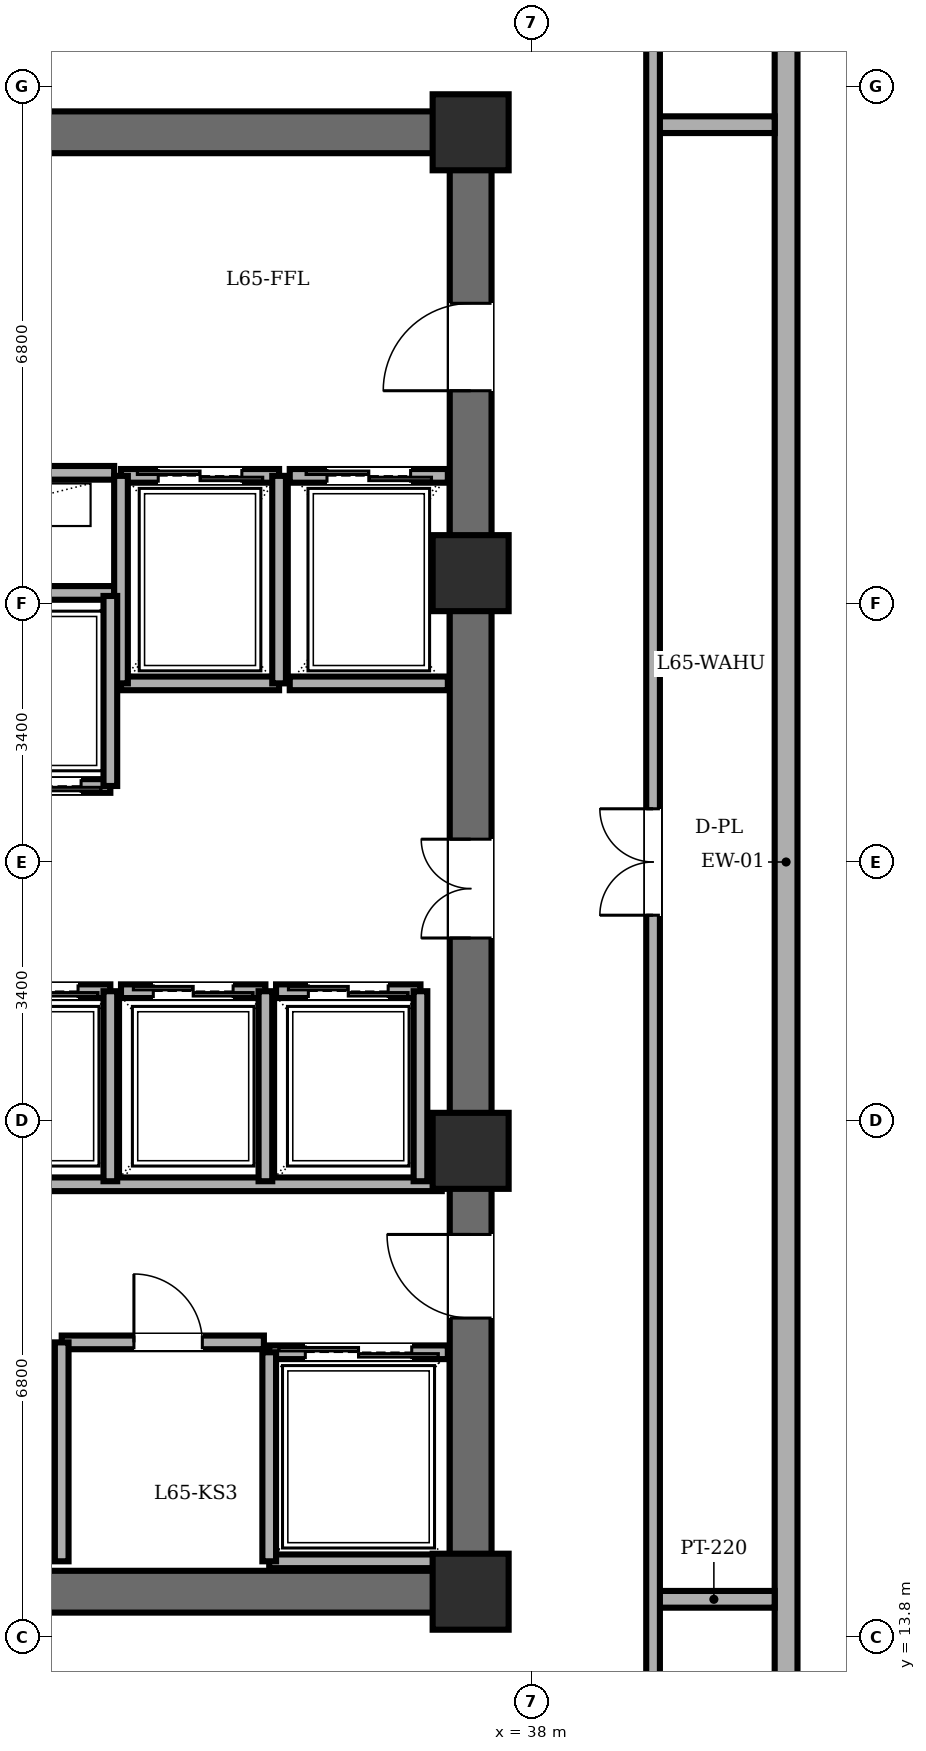
"""IFC4 building model, lengths in metres.
Left out: names, types, materials, properties, quantities, classifications, styles, units other than length and angle.
Written with IfcOpenShell. Run it as: python <this file> out.ifc"""

import sys

from ifc_helpers import new_model, si_unit, direction, frame, frame_2d, origin, origin_2d, place, context, subcontext, project, spatial, rectangle, extrude, element, fill, save


model = new_model("IFC4")
c1 = context("Model", 3, precision=1e-05, world=origin(), true_north=direction((0.0, 1.0)))
c2 = subcontext(c1, "Body", "Model", "MODEL_VIEW")
j1 = project(units=[si_unit("LENGTHUNIT", "METRE"), si_unit("PLANEANGLEUNIT", "RADIAN")], contexts=[c1])
p1 = place(None, origin())
s1 = spatial("IfcSite", under=j1, at=p1, CompositionType="ELEMENT")
p2 = place(p1, origin())
s2 = spatial("IfcBuilding", under=s1, at=p2, CompositionType="ELEMENT")
p3 = place(p2, frame((0.0, 0.0, 248.1)))
s3 = spatial("IfcBuildingStorey", under=s2, at=p3, CompositionType="ELEMENT", Elevation=248.1)
for number, where, z_axis, x_axis in (
    (1, (37.2, 14.4, 0.0), (0.0, 0.0, 1.0), (1.0, 0.0, 0.0)),
    (2, (37.2, 20.2, 0.0), (0.0, 0.0, 1.0), (1.0, 0.0, 0.0)),
    (3, (37.2, 27.8, 0.0), (0.0, 0.0, 1.0), (1.0, 0.0, 0.0)),
    (4, (37.2, 33.6, 0.0), (0.0, 0.0, 1.0), (1.0, 0.0, 0.0)),
):
    element("IfcColumn", number, at=place(p3, frame(where, z_axis=z_axis, x_axis=x_axis)), inside=s3, PredefinedType="COLUMN", context=c2, shape_type="SweptSolid", body=[
        extrude(rectangle(XDim=1.0, YDim=1.0, at=origin_2d()), origin(), (0.0, 0.0, 1.0), 5.6),
    ])
p4 = place(p3, frame((41.35, 7.8, 0.0), z_axis=(0.0, 0.0, 1.0), x_axis=(0.0, 1.0, 0.0)))
e5 = element("IfcWall", 5, at=p4, inside=s3, PredefinedType="SOLIDWALL", context=c2, shape_type="SweptSolid", body=[
    extrude(rectangle(XDim=32.4, YDim=0.3, at=frame_2d((16.2, 0.0))), origin(), (0.0, 0.0, 1.0), 5.36),
])
for number, where, z_axis, x_axis in (
    (6, (21.6, 33.6, 0.0), (0.0, 0.0, 1.0), (1.0, 0.0, 0.0)),
    (7, (37.2, 14.4, 0.0), (0.0, 0.0, 1.0), (-1.0, 0.0, 0.0)),
):
    element("IfcWall", number, at=place(p3, frame(where, z_axis=z_axis, x_axis=x_axis)), inside=s3, PredefinedType="SHEAR", context=c2, shape_type="SweptSolid", body=[
        extrude(rectangle(XDim=15.6, YDim=0.55, at=frame_2d((7.8, 0.0))), origin(), (0.0, 0.0, 1.0), 5.36),
    ])
p5 = place(p3, frame((37.2, 14.4, 0.0), z_axis=(0.0, 0.0, 1.0), x_axis=(0.0, 1.0, 0.0)))
e8 = element("IfcWall", 8, at=p5, inside=s3, PredefinedType="SHEAR", context=c2, shape_type="SweptSolid", body=[
    extrude(rectangle(XDim=19.2, YDim=0.55, at=frame_2d((9.6, 0.0))), origin(), (0.0, 0.0, 1.0), 5.36),
])
p6 = place(p5, frame((15.8, 0.0, 0.0)))
e9 = element("IfcOpeningElement", 9, at=p6, cuts=e8, PredefinedType="OPENING", context=c2, shape_type="SweptSolid", body=[
    extrude(rectangle(XDim=1.15, YDim=2.15, at=frame_2d((0.575, 1.075))), frame((0.0, 0.285, 0.0), z_axis=(0.0, -1.0, 0.0), x_axis=(1.0, 0.0, 0.0)), (0.0, 0.0, 1.0), 0.57),
])
p7 = place(p5, frame((3.6, 0.0, 0.0)))
e10 = element("IfcOpeningElement", 10, at=p7, cuts=e8, PredefinedType="OPENING", context=c2, shape_type="SweptSolid", body=[
    extrude(rectangle(XDim=1.1, YDim=2.15, at=frame_2d((0.55, 1.075))), frame((0.0, 0.285, 0.0), z_axis=(0.0, -1.0, 0.0), x_axis=(1.0, 0.0, 0.0)), (0.0, 0.0, 1.0), 0.57),
])
p8 = place(p5, frame((8.6, 0.0, 0.0)))
e11 = element("IfcOpeningElement", 11, at=p8, cuts=e8, PredefinedType="OPENING", context=c2, shape_type="SweptSolid", body=[
    extrude(rectangle(XDim=1.3, YDim=2.2, at=frame_2d((0.65, 1.1))), frame((0.0, 0.285, 0.0), z_axis=(0.0, -1.0, 0.0), x_axis=(1.0, 0.0, 0.0)), (0.0, 0.0, 1.0), 0.57),
])
p9 = place(p3, frame((30.27, 29.12, 0.0), z_axis=(0.0, 0.0, 1.0), x_axis=(1.0, 0.0, 0.0)))
e12 = element("IfcWall", 12, at=p9, inside=s3, PredefinedType="PARTITIONING", context=c2, shape_type="SweptSolid", body=[
    extrude(rectangle(XDim=2.24, YDim=0.18, at=frame_2d((1.12, 0.0))), origin(), (0.0, 0.0, 1.0), 5.36),
])
p10 = place(p3, frame((21.95, 27.54, 0.0), z_axis=(0.0, 0.0, 1.0), x_axis=(1.0, 0.0, 0.0)))
e13 = element("IfcWall", 13, at=p10, inside=s3, PredefinedType="PARTITIONING", context=c2, shape_type="SweptSolid", body=[
    extrude(rectangle(XDim=10.56, YDim=0.18, at=frame_2d((5.28, 0.0))), origin(), (0.0, 0.0, 1.0), 5.36),
])
p11 = place(p3, frame((21.95, 19.76, 0.0), z_axis=(0.0, 0.0, 1.0), x_axis=(1.0, 0.0, 0.0)))
e14 = element("IfcWall", 14, at=p11, inside=s3, PredefinedType="PARTITIONING", context=c2, shape_type="SweptSolid", body=[
    extrude(rectangle(XDim=14.87, YDim=0.18, at=frame_2d((7.435, 0.0))), origin(), (0.0, 0.0, 1.0), 5.36),
])
p12 = place(p3, frame((31.82, 17.68, 0.0), z_axis=(0.0, 0.0, 1.0), x_axis=(1.0, 0.0, 0.0)))
e15 = element("IfcWall", 15, at=p12, inside=s3, PredefinedType="PARTITIONING", context=c2, shape_type="SweptSolid", body=[
    extrude(rectangle(XDim=2.66, YDim=0.18, at=frame_2d((1.33, 0.0))), origin(), (0.0, 0.0, 1.0), 5.36),
])
p13 = place(p12, frame((0.95, 0.0, 0.0)))
e16 = element("IfcOpeningElement", 16, at=p13, cuts=e15, PredefinedType="OPENING", context=c2, shape_type="SweptSolid", body=[
    extrude(rectangle(XDim=0.9, YDim=2.05, at=frame_2d((0.45, 1.025))), frame((0.0, 0.1, 0.0), z_axis=(0.0, -1.0, 0.0), x_axis=(1.0, 0.0, 0.0)), (0.0, 0.0, 1.0), 0.2),
])
p14 = place(p3, frame((31.82, 14.8, 0.0), z_axis=(0.0, 0.0, 1.0), x_axis=(0.0, 1.0, 0.0)))
e17 = element("IfcWall", 17, at=p14, inside=s3, PredefinedType="PARTITIONING", context=c2, shape_type="SweptSolid", body=[
    extrude(rectangle(XDim=2.88, YDim=0.18, at=frame_2d((1.44, 0.0))), origin(), (0.0, 0.0, 1.0), 5.36),
])
p15 = place(p3, frame((32.6, 29.08, 0.0), z_axis=(0.0, 0.0, 1.0), x_axis=(1.0, 0.0, 0.0)))
e18 = element("IfcWall", 18, at=p15, inside=s3, PredefinedType="PARTITIONING", context=c2, shape_type="SweptSolid", body=[
    extrude(rectangle(XDim=2.08, YDim=0.18, at=frame_2d((1.04, 0.0))), origin(), (0.0, 0.0, 1.0), 5.36),
])
p16 = place(p15, frame((0.49, 0.0, 0.0)))
e19 = element("IfcOpeningElement", 19, at=p16, cuts=e18, PredefinedType="OPENING", context=c2, shape_type="SweptSolid", body=[
    extrude(rectangle(XDim=1.1, YDim=2.2, at=frame_2d((0.55, 1.1))), frame((0.0, 0.1, 0.0), z_axis=(0.0, -1.0, 0.0), x_axis=(1.0, 0.0, 0.0)), (0.0, 0.0, 1.0), 0.2),
])
p17 = place(p3, frame((34.68, 26.35, 0.0), z_axis=(0.0, 0.0, 1.0), x_axis=(-1.0, 0.0, 0.0)))
e20 = element("IfcWall", 20, at=p17, inside=s3, PredefinedType="PARTITIONING", context=c2, shape_type="SweptSolid", body=[
    extrude(rectangle(XDim=2.08, YDim=0.18, at=frame_2d((1.04, 0.0))), origin(), (0.0, 0.0, 1.0), 5.36),
])
for number, where, z_axis, x_axis in (
    (21, (34.68, 26.35, 0.0), (0.0, 0.0, 1.0), (0.0, 1.0, 0.0)),
    (22, (32.6, 29.08, 0.0), (0.0, 0.0, 1.0), (0.0, -1.0, 0.0)),
):
    element("IfcWall", number, at=place(p3, frame(where, z_axis=z_axis, x_axis=x_axis)), inside=s3, PredefinedType="PARTITIONING", context=c2, shape_type="SweptSolid", body=[
        extrude(rectangle(XDim=2.73, YDim=0.18, at=frame_2d((1.365, 0.0))), origin(), (0.0, 0.0, 1.0), 5.36),
    ])
p18 = place(p3, frame((34.82, 29.08, 0.0), z_axis=(0.0, 0.0, 1.0), x_axis=(1.0, 0.0, 0.0)))
e23 = element("IfcWall", 23, at=p18, inside=s3, PredefinedType="PARTITIONING", context=c2, shape_type="SweptSolid", body=[
    extrude(rectangle(XDim=2.08, YDim=0.18, at=frame_2d((1.04, 0.0))), origin(), (0.0, 0.0, 1.0), 5.36),
])
p19 = place(p18, frame((0.49, 0.0, 0.0)))
e24 = element("IfcOpeningElement", 24, at=p19, cuts=e23, PredefinedType="OPENING", context=c2, shape_type="SweptSolid", body=[
    extrude(rectangle(XDim=1.1, YDim=2.2, at=frame_2d((0.55, 1.1))), frame((0.0, 0.1, 0.0), z_axis=(0.0, -1.0, 0.0), x_axis=(1.0, 0.0, 0.0)), (0.0, 0.0, 1.0), 0.2),
])
p20 = place(p3, frame((36.9, 26.35, 0.0), z_axis=(0.0, 0.0, 1.0), x_axis=(-1.0, 0.0, 0.0)))
e25 = element("IfcWall", 25, at=p20, inside=s3, PredefinedType="PARTITIONING", context=c2, shape_type="SweptSolid", body=[
    extrude(rectangle(XDim=2.08, YDim=0.18, at=frame_2d((1.04, 0.0))), origin(), (0.0, 0.0, 1.0), 5.36),
])
p21 = place(p3, frame((34.55, 17.55, 0.0), z_axis=(0.0, 0.0, 1.0), x_axis=(1.0, 0.0, 0.0)))
e26 = element("IfcWall", 26, at=p21, inside=s3, PredefinedType="PARTITIONING", context=c2, shape_type="SweptSolid", body=[
    extrude(rectangle(XDim=2.35, YDim=0.18, at=frame_2d((1.175, 0.0))), origin(), (0.0, 0.0, 1.0), 5.36),
])
p22 = place(p21, frame((0.475, 0.0, 0.0)))
e27 = element("IfcOpeningElement", 27, at=p22, cuts=e26, PredefinedType="OPENING", context=c2, shape_type="SweptSolid", body=[
    extrude(rectangle(XDim=1.4, YDim=2.3, at=frame_2d((0.7, 1.15))), frame((0.0, 0.1, 0.0), z_axis=(0.0, -1.0, 0.0), x_axis=(1.0, 0.0, 0.0)), (0.0, 0.0, 1.0), 0.2),
])
p23 = place(p3, frame((36.9, 14.8, 0.0), z_axis=(0.0, 0.0, 1.0), x_axis=(-1.0, 0.0, 0.0)))
e28 = element("IfcWall", 28, at=p23, inside=s3, PredefinedType="PARTITIONING", context=c2, shape_type="SweptSolid", body=[
    extrude(rectangle(XDim=2.35, YDim=0.18, at=frame_2d((1.175, 0.0))), origin(), (0.0, 0.0, 1.0), 2.942),
])
p24 = place(p3, frame((34.55, 17.55, 0.0), z_axis=(0.0, 0.0, 1.0), x_axis=(0.0, -1.0, 0.0)))
e29 = element("IfcWall", 29, at=p24, inside=s3, PredefinedType="PARTITIONING", context=c2, shape_type="SweptSolid", body=[
    extrude(rectangle(XDim=2.75, YDim=0.18, at=frame_2d((1.375, 0.0))), origin(), (0.0, 0.0, 1.0), 5.36),
])
p25 = place(p3, frame((32.46, 25.0, 0.0), z_axis=(0.0, 0.0, 1.0), x_axis=(-1.0, 0.0, 0.0)))
e30 = element("IfcWall", 30, at=p25, inside=s3, PredefinedType="PARTITIONING", context=c2, shape_type="SweptSolid", body=[
    extrude(rectangle(XDim=1.82, YDim=0.18, at=frame_2d((0.91, 0.0))), origin(), (0.0, 0.0, 1.0), 5.36),
])
p26 = place(p25, frame((0.385, 0.0, 0.0)))
e31 = element("IfcOpeningElement", 31, at=p26, cuts=e30, PredefinedType="OPENING", context=c2, shape_type="SweptSolid", body=[
    extrude(rectangle(XDim=1.05, YDim=2.2, at=frame_2d((0.525, 1.1))), frame((0.0, 0.1, 0.0), z_axis=(0.0, -1.0, 0.0), x_axis=(1.0, 0.0, 0.0)), (0.0, 0.0, 1.0), 0.2),
])
p27 = place(p3, frame((32.46, 25.0, 0.0), z_axis=(0.0, 0.0, 1.0), x_axis=(0.0, 1.0, 0.0)))
e32 = element("IfcWall", 32, at=p27, inside=s3, PredefinedType="PARTITIONING", context=c2, shape_type="SweptSolid", body=[
    extrude(rectangle(XDim=2.5, YDim=0.18, at=frame_2d((1.25, 0.0))), origin(), (0.0, 0.0, 1.0), 5.36),
])
p28 = place(p3, frame((30.56, 22.3, 0.0), z_axis=(0.0, 0.0, 1.0), x_axis=(1.0, 0.0, 0.0)))
e33 = element("IfcWall", 33, at=p28, inside=s3, PredefinedType="PARTITIONING", context=c2, shape_type="SweptSolid", body=[
    extrude(rectangle(XDim=1.9, YDim=0.18, at=frame_2d((0.95, 0.0))), origin(), (0.0, 0.0, 1.0), 5.36),
])
p29 = place(p28, frame((0.425, 0.0, 0.0)))
e34 = element("IfcOpeningElement", 34, at=p29, cuts=e33, PredefinedType="OPENING", context=c2, shape_type="SweptSolid", body=[
    extrude(rectangle(XDim=1.05, YDim=2.2, at=frame_2d((0.525, 1.1))), frame((0.0, 0.1, 0.0), z_axis=(0.0, -1.0, 0.0), x_axis=(1.0, 0.0, 0.0)), (0.0, 0.0, 1.0), 0.2),
])
p30 = place(p3, frame((32.46, 19.8, 0.0), z_axis=(0.0, 0.0, 1.0), x_axis=(0.0, 1.0, 0.0)))
e35 = element("IfcWall", 35, at=p30, inside=s3, PredefinedType="PARTITIONING", context=c2, shape_type="SweptSolid", body=[
    extrude(rectangle(XDim=2.5, YDim=0.18, at=frame_2d((1.25, 0.0))), origin(), (0.0, 0.0, 1.0), 5.36),
])
p31 = place(p3, frame((32.6, 22.3, 0.0), z_axis=(0.0, 0.0, 1.0), x_axis=(1.0, 0.0, 0.0)))
e36 = element("IfcWall", 36, at=p31, inside=s3, PredefinedType="PARTITIONING", context=c2, shape_type="SweptSolid", body=[
    extrude(rectangle(XDim=1.9, YDim=0.18, at=frame_2d((0.95, 0.0))), origin(), (0.0, 0.0, 1.0), 5.36),
])
p32 = place(p31, frame((0.425, 0.0, 0.0)))
e37 = element("IfcOpeningElement", 37, at=p32, cuts=e36, PredefinedType="OPENING", context=c2, shape_type="SweptSolid", body=[
    extrude(rectangle(XDim=1.05, YDim=2.2, at=frame_2d((0.525, 1.1))), frame((0.0, 0.1, 0.0), z_axis=(0.0, -1.0, 0.0), x_axis=(1.0, 0.0, 0.0)), (0.0, 0.0, 1.0), 0.2),
])
p33 = place(p3, frame((34.5, 19.8, 0.0), z_axis=(0.0, 0.0, 1.0), x_axis=(0.0, 1.0, 0.0)))
e38 = element("IfcWall", 38, at=p33, inside=s3, PredefinedType="PARTITIONING", context=c2, shape_type="SweptSolid", body=[
    extrude(rectangle(XDim=2.5, YDim=0.18, at=frame_2d((1.25, 0.0))), origin(), (0.0, 0.0, 1.0), 5.36),
])
p34 = place(p3, frame((34.64, 22.3, 0.0), z_axis=(0.0, 0.0, 1.0), x_axis=(1.0, 0.0, 0.0)))
e39 = element("IfcWall", 39, at=p34, inside=s3, PredefinedType="PARTITIONING", context=c2, shape_type="SweptSolid", body=[
    extrude(rectangle(XDim=1.9, YDim=0.18, at=frame_2d((0.95, 0.0))), origin(), (0.0, 0.0, 1.0), 5.36),
])
p35 = place(p34, frame((0.425, 0.0, 0.0)))
e40 = element("IfcOpeningElement", 40, at=p35, cuts=e39, PredefinedType="OPENING", context=c2, shape_type="SweptSolid", body=[
    extrude(rectangle(XDim=1.05, YDim=2.2, at=frame_2d((0.525, 1.1))), frame((0.0, 0.1, 0.0), z_axis=(0.0, -1.0, 0.0), x_axis=(1.0, 0.0, 0.0)), (0.0, 0.0, 1.0), 0.2),
])
p36 = place(p3, frame((36.54, 19.8, 0.0), z_axis=(0.0, 0.0, 1.0), x_axis=(0.0, 1.0, 0.0)))
e41 = element("IfcWall", 41, at=p36, inside=s3, PredefinedType="PARTITIONING", context=c2, shape_type="SweptSolid", body=[
    extrude(rectangle(XDim=2.5, YDim=0.18, at=frame_2d((1.25, 0.0))), origin(), (0.0, 0.0, 1.0), 5.36),
])
for number, where, z_axis, x_axis in (
    (42, (39.6, 14.3, 0.0), (0.0, 0.0, 1.0), (1.0, 0.0, 0.0)),
    (43, (39.6, 33.7, 0.0), (0.0, 0.0, 1.0), (1.0, 0.0, 0.0)),
):
    element("IfcWall", number, at=place(p3, frame(where, z_axis=z_axis, x_axis=x_axis)), inside=s3, PredefinedType="PARTITIONING", context=c2, shape_type="SweptSolid", body=[
        extrude(rectangle(XDim=1.6, YDim=0.22, at=frame_2d((0.8, 0.0))), origin(), (0.0, 0.0, 1.0), 2.942),
    ])
p37 = place(p3, frame((39.6, 11.8, 0.0), z_axis=(0.0, 0.0, 1.0), x_axis=(0.0, 1.0, 0.0)))
e44 = element("IfcWall", 44, at=p37, inside=s3, PredefinedType="PARTITIONING", context=c2, shape_type="SweptSolid", body=[
    extrude(rectangle(XDim=24.4, YDim=0.18, at=frame_2d((12.2, 0.0))), origin(), (0.0, 0.0, 1.0), 5.36),
])
p38 = place(p37, frame((11.5, 0.0, 0.0)))
e45 = element("IfcOpeningElement", 45, at=p38, cuts=e44, PredefinedType="OPENING", context=c2, shape_type="SweptSolid", body=[
    extrude(rectangle(XDim=1.4, YDim=2.25, at=frame_2d((0.7, 1.125))), frame((0.0, 0.1, 0.0), z_axis=(0.0, -1.0, 0.0), x_axis=(1.0, 0.0, 0.0)), (0.0, 0.0, 1.0), 0.2),
])
p39 = place(p6, origin())
e46 = element("IfcDoor", 46, at=p39, inside=s3, OperationType="SINGLE_SWING_LEFT", PredefinedType="DOOR", context=c2, shape_type="SweptSolid", body=[
    extrude(rectangle(XDim=1.15, YDim=2.15, at=frame_2d((0.575, 1.075))), frame((0.0, 0.025, 0.0), z_axis=(0.0, -1.0, 0.0), x_axis=(1.0, 0.0, 0.0)), (0.0, 0.0, 1.0), 0.05),
])
fill(e9, e46)
p40 = place(p7, origin())
e47 = element("IfcDoor", 47, at=p40, inside=s3, OperationType="SINGLE_SWING_RIGHT", PredefinedType="DOOR", context=c2, shape_type="SweptSolid", body=[
    extrude(rectangle(XDim=1.1, YDim=2.15, at=frame_2d((0.55, 1.075))), frame((0.0, 0.025, 0.0), z_axis=(0.0, -1.0, 0.0), x_axis=(1.0, 0.0, 0.0)), (0.0, 0.0, 1.0), 0.05),
])
fill(e10, e47)
p41 = place(p13, origin())
e48 = element("IfcDoor", 48, at=p41, inside=s3, OperationType="SINGLE_SWING_LEFT", PredefinedType="DOOR", context=c2, shape_type="SweptSolid", body=[
    extrude(rectangle(XDim=0.9, YDim=2.05, at=frame_2d((0.45, 1.025))), frame((0.0, 0.025, 0.0), z_axis=(0.0, -1.0, 0.0), x_axis=(1.0, 0.0, 0.0)), (0.0, 0.0, 1.0), 0.05),
])
fill(e16, e48)
p42 = place(p16, origin())
e49 = element("IfcDoor", 49, at=p42, inside=s3, OperationType="DOUBLE_DOOR_SLIDING", PredefinedType="DOOR", context=c2, shape_type="SweptSolid", body=[
    extrude(rectangle(XDim=1.1, YDim=2.2, at=frame_2d((0.55, 1.1))), frame((0.0, 0.025, 0.0), z_axis=(0.0, -1.0, 0.0), x_axis=(1.0, 0.0, 0.0)), (0.0, 0.0, 1.0), 0.05),
])
fill(e19, e49)
p43 = place(p19, origin())
e50 = element("IfcDoor", 50, at=p43, inside=s3, OperationType="DOUBLE_DOOR_SLIDING", PredefinedType="DOOR", context=c2, shape_type="SweptSolid", body=[
    extrude(rectangle(XDim=1.1, YDim=2.2, at=frame_2d((0.55, 1.1))), frame((0.0, 0.025, 0.0), z_axis=(0.0, -1.0, 0.0), x_axis=(1.0, 0.0, 0.0)), (0.0, 0.0, 1.0), 0.05),
])
fill(e24, e50)
p44 = place(p22, origin())
e51 = element("IfcDoor", 51, at=p44, inside=s3, OperationType="DOUBLE_DOOR_SLIDING", PredefinedType="DOOR", context=c2, shape_type="SweptSolid", body=[
    extrude(rectangle(XDim=1.4, YDim=2.3, at=frame_2d((0.7, 1.15))), frame((0.0, 0.025, 0.0), z_axis=(0.0, -1.0, 0.0), x_axis=(1.0, 0.0, 0.0)), (0.0, 0.0, 1.0), 0.05),
])
fill(e27, e51)
p45 = place(p26, origin())
e52 = element("IfcDoor", 52, at=p45, inside=s3, OperationType="DOUBLE_DOOR_SLIDING", PredefinedType="DOOR", context=c2, shape_type="SweptSolid", body=[
    extrude(rectangle(XDim=1.05, YDim=2.2, at=frame_2d((0.525, 1.1))), frame((0.0, 0.025, 0.0), z_axis=(0.0, -1.0, 0.0), x_axis=(1.0, 0.0, 0.0)), (0.0, 0.0, 1.0), 0.05),
])
fill(e31, e52)
p46 = place(p29, origin())
e53 = element("IfcDoor", 53, at=p46, inside=s3, OperationType="DOUBLE_DOOR_SLIDING", PredefinedType="DOOR", context=c2, shape_type="SweptSolid", body=[
    extrude(rectangle(XDim=1.05, YDim=2.2, at=frame_2d((0.525, 1.1))), frame((0.0, 0.025, 0.0), z_axis=(0.0, -1.0, 0.0), x_axis=(1.0, 0.0, 0.0)), (0.0, 0.0, 1.0), 0.05),
])
fill(e34, e53)
p47 = place(p32, origin())
e54 = element("IfcDoor", 54, at=p47, inside=s3, OperationType="DOUBLE_DOOR_SLIDING", PredefinedType="DOOR", context=c2, shape_type="SweptSolid", body=[
    extrude(rectangle(XDim=1.05, YDim=2.2, at=frame_2d((0.525, 1.1))), frame((0.0, 0.025, 0.0), z_axis=(0.0, -1.0, 0.0), x_axis=(1.0, 0.0, 0.0)), (0.0, 0.0, 1.0), 0.05),
])
fill(e37, e54)
p48 = place(p35, origin())
e55 = element("IfcDoor", 55, at=p48, inside=s3, OperationType="DOUBLE_DOOR_SLIDING", PredefinedType="DOOR", context=c2, shape_type="SweptSolid", body=[
    extrude(rectangle(XDim=1.05, YDim=2.2, at=frame_2d((0.525, 1.1))), frame((0.0, 0.025, 0.0), z_axis=(0.0, -1.0, 0.0), x_axis=(1.0, 0.0, 0.0)), (0.0, 0.0, 1.0), 0.05),
])
fill(e40, e55)
p49 = place(p8, origin())
e56 = element("IfcDoor", 56, at=p49, inside=s3, OperationType="DOUBLE_DOOR_SINGLE_SWING", PredefinedType="DOOR", context=c2, shape_type="SweptSolid", body=[
    extrude(rectangle(XDim=1.3, YDim=2.2, at=frame_2d((0.65, 1.1))), frame((0.0, 0.025, 0.0), z_axis=(0.0, -1.0, 0.0), x_axis=(1.0, 0.0, 0.0)), (0.0, 0.0, 1.0), 0.05),
])
fill(e11, e56)
p50 = place(p38, origin())
e57 = element("IfcDoor", 57, at=p50, inside=s3, OperationType="DOUBLE_DOOR_SINGLE_SWING", PredefinedType="DOOR", context=c2, shape_type="SweptSolid", body=[
    extrude(rectangle(XDim=1.4, YDim=2.25, at=frame_2d((0.7, 1.125))), frame((0.0, 0.025, 0.0), z_axis=(0.0, -1.0, 0.0), x_axis=(1.0, 0.0, 0.0)), (0.0, 0.0, 1.0), 0.05),
])
fill(e45, e57)
save(model, sys.argv[1])
